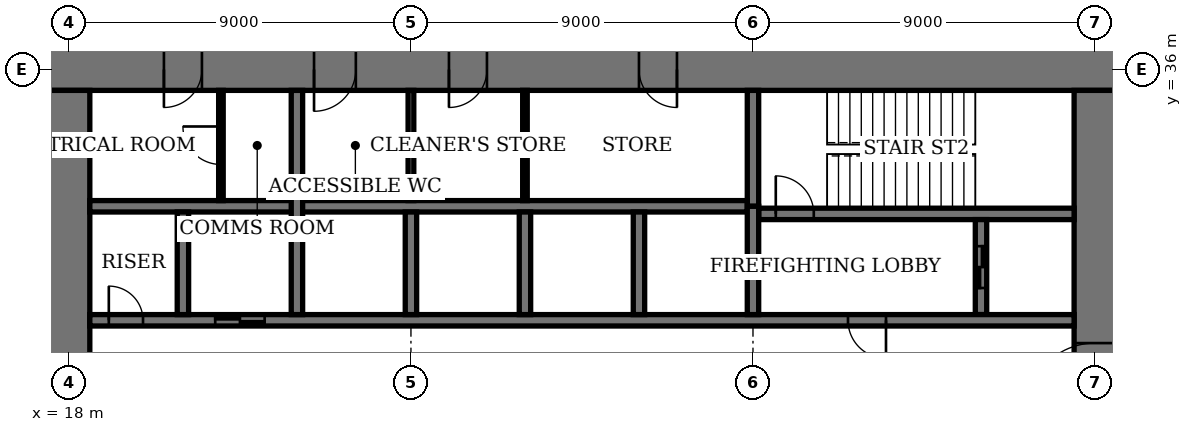
"""IFC4 building model, lengths in metres.
Left out: names, types, materials, properties, quantities, classifications, styles, units other than length and angle.
Written with IfcOpenShell. Run it as: python <this file> out.ifc"""

import sys

from ifc_helpers import new_model, si_unit, direction, frame, frame_2d, origin, place, context, subcontext, project, spatial, rectangle, extrude, element, fill, save


model = new_model("IFC4")
c1 = context("Model", 3, precision=1e-05, world=origin(), true_north=direction((0.0, 1.0)))
c2 = subcontext(c1, "Body", "Model", "MODEL_VIEW")
j1 = project(units=[si_unit("LENGTHUNIT", "METRE"), si_unit("PLANEANGLEUNIT", "RADIAN")], contexts=[c1])
p1 = place(None, origin())
s1 = spatial("IfcSite", under=j1, at=p1, CompositionType="ELEMENT")
p2 = place(p1, origin())
s2 = spatial("IfcBuilding", under=s1, at=p2, CompositionType="ELEMENT")
p3 = place(p2, frame((0.0, 0.0, 63.8)))
s3 = spatial("IfcBuildingStorey", under=s2, at=p3, CompositionType="ELEMENT", Elevation=63.8)
p4 = place(p3, frame((45.55, 36.0, 0.0), z_axis=(0.0, 0.0, 1.0), x_axis=(-1.0, 0.0, 0.0)))
e1 = element("IfcWall", 1, at=p4, inside=s3, PredefinedType="SHEAR", context=c2, shape_type="SweptSolid", body=[
    extrude(rectangle(XDim=28.1, YDim=1.1, at=frame_2d((14.05, 0.0))), origin(), (0.0, 0.0, 1.0), 4.0),
])
p5 = place(p4, frame((11.55, 0.0, 0.0)))
e2 = element("IfcOpeningElement", 2, at=p5, cuts=e1, PredefinedType="OPENING", context=c2, shape_type="SweptSolid", body=[
    extrude(rectangle(XDim=1.0, YDim=2.4, at=frame_2d((0.5, 1.2))), frame((0.0, 0.56, 0.0), z_axis=(0.0, -1.0, 0.0), x_axis=(1.0, 0.0, 0.0)), (0.0, 0.0, 1.0), 1.12),
])
p6 = place(p4, frame((16.55, 0.0, 0.0)))
e3 = element("IfcOpeningElement", 3, at=p6, cuts=e1, PredefinedType="OPENING", context=c2, shape_type="SweptSolid", body=[
    extrude(rectangle(XDim=1.0, YDim=2.4, at=frame_2d((0.5, 1.2))), frame((0.0, 0.56, 0.0), z_axis=(0.0, -1.0, 0.0), x_axis=(1.0, 0.0, 0.0)), (0.0, 0.0, 1.0), 1.12),
])
p7 = place(p4, frame((20.0, 0.0, 0.0)))
e4 = element("IfcOpeningElement", 4, at=p7, cuts=e1, PredefinedType="OPENING", context=c2, shape_type="SweptSolid", body=[
    extrude(rectangle(XDim=1.1, YDim=2.4, at=frame_2d((0.55, 1.2))), frame((0.0, 0.56, 0.0), z_axis=(0.0, -1.0, 0.0), x_axis=(1.0, 0.0, 0.0)), (0.0, 0.0, 1.0), 1.12),
])
p8 = place(p4, frame((24.05, 0.0, 0.0)))
e5 = element("IfcOpeningElement", 5, at=p8, cuts=e1, PredefinedType="OPENING", context=c2, shape_type="SweptSolid", body=[
    extrude(rectangle(XDim=1.0, YDim=2.4, at=frame_2d((0.5, 1.2))), frame((0.0, 0.56, 0.0), z_axis=(0.0, -1.0, 0.0), x_axis=(1.0, 0.0, 0.0)), (0.0, 0.0, 1.0), 1.12),
])
p9 = place(p3, frame((18.0, 35.45, 0.0), z_axis=(0.0, 0.0, 1.0), x_axis=(0.0, -1.0, 0.0)))
e6 = element("IfcWall", 6, at=p9, inside=s3, PredefinedType="SHEAR", context=c2, shape_type="SweptSolid", body=[
    extrude(rectangle(XDim=16.9, YDim=1.1, at=frame_2d((8.45, 0.0))), origin(), (0.0, 0.0, 1.0), 4.0),
])
p10 = place(p9, frame((8.45, 0.0, 0.0)))
e7 = element("IfcOpeningElement", 7, at=p10, cuts=e6, PredefinedType="OPENING", context=c2, shape_type="SweptSolid", body=[
    extrude(rectangle(XDim=1.8, YDim=2.4, at=frame_2d((0.9, 1.2))), frame((0.0, 0.56, 0.0), z_axis=(0.0, -1.0, 0.0), x_axis=(1.0, 0.0, 0.0)), (0.0, 0.0, 1.0), 1.12),
])
p11 = place(p3, frame((45.0, 18.55, 0.0), z_axis=(0.0, 0.0, 1.0), x_axis=(0.0, 1.0, 0.0)))
e8 = element("IfcWall", 8, at=p11, inside=s3, PredefinedType="SHEAR", context=c2, shape_type="SweptSolid", body=[
    extrude(rectangle(XDim=16.9, YDim=1.1, at=frame_2d((8.45, 0.0))), origin(), (0.0, 0.0, 1.0), 4.0),
])
p12 = place(p11, frame((8.45, 0.0, 0.0)))
e9 = element("IfcOpeningElement", 9, at=p12, cuts=e8, PredefinedType="OPENING", context=c2, shape_type="SweptSolid", body=[
    extrude(rectangle(XDim=1.8, YDim=2.4, at=frame_2d((0.9, 1.2))), frame((0.0, 0.56, 0.0), z_axis=(0.0, -1.0, 0.0), x_axis=(1.0, 0.0, 0.0)), (0.0, 0.0, 1.0), 1.12),
])
p13 = place(p3, frame((36.15, 32.2, 0.0), z_axis=(0.0, 0.0, 1.0), x_axis=(1.0, 0.0, 0.0)))
e10 = element("IfcWall", 10, at=p13, inside=s3, PredefinedType="SHEAR", context=c2, shape_type="SweptSolid", body=[
    extrude(rectangle(XDim=8.3, YDim=0.3, at=frame_2d((4.15, 0.0))), origin(), (0.0, 0.0, 1.0), 4.0),
])
p14 = place(p13, frame((0.45, 0.0, 0.0)))
e11 = element("IfcOpeningElement", 11, at=p14, cuts=e10, PredefinedType="OPENING", context=c2, shape_type="SweptSolid", body=[
    extrude(rectangle(XDim=1.0, YDim=2.4, at=frame_2d((0.5, 1.2))), frame((0.0, 0.16, 0.0), z_axis=(0.0, -1.0, 0.0), x_axis=(1.0, 0.0, 0.0)), (0.0, 0.0, 1.0), 0.32),
])
p15 = place(p3, frame((36.0, 32.4, 0.0), z_axis=(0.0, 0.0, 1.0), x_axis=(0.0, 1.0, 0.0)))
e12 = element("IfcWall", 12, at=p15, inside=s3, PredefinedType="SHEAR", context=c2, shape_type="SweptSolid", body=[
    extrude(rectangle(XDim=3.05, YDim=0.3, at=frame_2d((1.525, 0.0))), origin(), (0.0, 0.0, 1.0), 4.0),
])
p16 = place(p3, frame((42.0, 29.55, 0.0), z_axis=(0.0, 0.0, 1.0), x_axis=(0.0, 1.0, 0.0)))
e13 = element("IfcWall", 13, at=p16, inside=s3, PredefinedType="SHEAR", context=c2, shape_type="SweptSolid", body=[
    extrude(rectangle(XDim=2.5, YDim=0.3, at=frame_2d((1.25, 0.0))), origin(), (0.0, 0.0, 1.0), 4.0),
])
p17 = place(p16, frame((0.7, 0.0, 0.0)))
e14 = element("IfcOpeningElement", 14, at=p17, cuts=e13, PredefinedType="OPENING", context=c2, shape_type="SweptSolid", body=[
    extrude(rectangle(XDim=1.1, YDim=2.4, at=frame_2d((0.55, 1.2))), frame((0.0, 0.16, 0.0), z_axis=(0.0, -1.0, 0.0), x_axis=(1.0, 0.0, 0.0)), (0.0, 0.0, 1.0), 0.32),
])
p18 = place(p3, frame((18.55, 29.4, 0.0), z_axis=(0.0, 0.0, 1.0), x_axis=(1.0, 0.0, 0.0)))
e15 = element("IfcWall", 15, at=p18, inside=s3, PredefinedType="SHEAR", context=c2, shape_type="SweptSolid", body=[
    extrude(rectangle(XDim=25.9, YDim=0.3, at=frame_2d((12.95, 0.0))), origin(), (0.0, 0.0, 1.0), 4.0),
])
p19 = place(p18, frame((19.95, 0.0, 0.0)))
e16 = element("IfcOpeningElement", 16, at=p19, cuts=e15, PredefinedType="OPENING", context=c2, shape_type="SweptSolid", body=[
    extrude(rectangle(XDim=1.0, YDim=2.4, at=frame_2d((0.5, 1.2))), frame((0.0, 0.16, 0.0), z_axis=(0.0, -1.0, 0.0), x_axis=(1.0, 0.0, 0.0)), (0.0, 0.0, 1.0), 0.32),
])
p20 = place(p18, frame((0.5, 0.0, 0.0)))
e17 = element("IfcOpeningElement", 17, at=p20, cuts=e15, PredefinedType="OPENING", context=c2, shape_type="SweptSolid", body=[
    extrude(rectangle(XDim=0.9, YDim=2.1, at=frame_2d((0.45, 1.05))), frame((0.0, 0.16, 0.0), z_axis=(0.0, -1.0, 0.0), x_axis=(1.0, 0.0, 0.0)), (0.0, 0.0, 1.0), 0.32),
])
p21 = place(p18, frame((3.3, 0.0, 0.0)))
e18 = element("IfcOpeningElement", 18, at=p21, cuts=e15, PredefinedType="OPENING", context=c2, shape_type="SweptSolid", body=[
    extrude(rectangle(XDim=1.3, YDim=2.4, at=frame_2d((0.65, 1.2))), frame((0.0, 0.16, 0.0), z_axis=(0.0, -1.0, 0.0), x_axis=(1.0, 0.0, 0.0)), (0.0, 0.0, 1.0), 0.32),
])
p22 = place(p3, frame((18.55, 32.4, 0.0), z_axis=(0.0, 0.0, 1.0), x_axis=(1.0, 0.0, 0.0)))
e19 = element("IfcWall", 19, at=p22, inside=s3, PredefinedType="SHEAR", context=c2, shape_type="SweptSolid", body=[
    extrude(rectangle(XDim=17.3, YDim=0.3, at=frame_2d((8.65, 0.0))), origin(), (0.0, 0.0, 1.0), 4.0),
])
for number, where, z_axis, x_axis in (
    (20, (33.0, 29.55, 0.0), (0.0, 0.0, 1.0), (0.0, 1.0, 0.0)),
    (21, (30.0, 29.55, 0.0), (0.0, 0.0, 1.0), (0.0, 1.0, 0.0)),
    (22, (27.0, 29.55, 0.0), (0.0, 0.0, 1.0), (0.0, 1.0, 0.0)),
):
    element("IfcWall", number, at=place(p3, frame(where, z_axis=z_axis, x_axis=x_axis)), inside=s3, PredefinedType="SHEAR", context=c2, shape_type="SweptSolid", body=[
        extrude(rectangle(XDim=2.7, YDim=0.3, at=frame_2d((1.35, 0.0))), origin(), (0.0, 0.0, 1.0), 4.0),
    ])
p23 = place(p3, frame((24.0, 29.55, 0.0), z_axis=(0.0, 0.0, 1.0), x_axis=(0.0, 1.0, 0.0)))
e23 = element("IfcWall", 23, at=p23, inside=s3, PredefinedType="SHEAR", context=c2, shape_type="SweptSolid", body=[
    extrude(rectangle(XDim=5.9, YDim=0.3, at=frame_2d((2.95, 0.0))), origin(), (0.0, 0.0, 1.0), 4.0),
])
p24 = place(p3, frame((21.0, 29.55, 0.0), z_axis=(0.0, 0.0, 1.0), x_axis=(0.0, 1.0, 0.0)))
e24 = element("IfcWall", 24, at=p24, inside=s3, PredefinedType="SHEAR", context=c2, shape_type="SweptSolid", body=[
    extrude(rectangle(XDim=2.7, YDim=0.3, at=frame_2d((1.35, 0.0))), origin(), (0.0, 0.0, 1.0), 4.0),
])
p25 = place(p3, frame((36.0, 29.55, 0.0), z_axis=(0.0, 0.0, 1.0), x_axis=(0.0, 1.0, 0.0)))
e25 = element("IfcWall", 25, at=p25, inside=s3, PredefinedType="SHEAR", context=c2, shape_type="SweptSolid", body=[
    extrude(rectangle(XDim=2.85, YDim=0.3, at=frame_2d((1.425, 0.0))), origin(), (0.0, 0.0, 1.0), 4.0),
])
p26 = place(p3, frame((30.0, 32.55, 0.0), z_axis=(0.0, 0.0, 1.0), x_axis=(0.0, 1.0, 0.0)))
e26 = element("IfcWall", 26, at=p26, inside=s3, PredefinedType="PARTITIONING", context=c2, shape_type="SweptSolid", body=[
    extrude(rectangle(XDim=2.9, YDim=0.12, at=frame_2d((1.45, 0.0))), origin(), (0.0, 0.0, 1.0), 3.75),
])
p27 = place(p3, frame((27.0, 32.55, 0.0), z_axis=(0.0, 0.0, 1.0), x_axis=(0.0, 1.0, 0.0)))
e27 = element("IfcWall", 27, at=p27, inside=s3, PredefinedType="PARTITIONING", context=c2, shape_type="SweptSolid", body=[
    extrude(rectangle(XDim=2.9, YDim=0.15, at=frame_2d((1.45, 0.0))), origin(), (0.0, 0.0, 1.0), 3.75),
])
p28 = place(p3, frame((22.0, 32.55, 0.0), z_axis=(0.0, 0.0, 1.0), x_axis=(0.0, 1.0, 0.0)))
e28 = element("IfcWall", 28, at=p28, inside=s3, PredefinedType="PARTITIONING", context=c2, shape_type="SweptSolid", body=[
    extrude(rectangle(XDim=2.9, YDim=0.12, at=frame_2d((1.45, 0.0))), origin(), (0.0, 0.0, 1.0), 3.75),
])
p29 = place(p28, frame((0.95, 0.0, 0.0)))
e29 = element("IfcOpeningElement", 29, at=p29, cuts=e28, PredefinedType="OPENING", context=c2, shape_type="SweptSolid", body=[
    extrude(rectangle(XDim=1.0, YDim=2.4, at=frame_2d((0.5, 1.2))), frame((0.0, 0.07, 0.0), z_axis=(0.0, -1.0, 0.0), x_axis=(1.0, 0.0, 0.0)), (0.0, 0.0, 1.0), 0.14),
])
p30 = place(p12, origin())
e30 = element("IfcDoor", 30, at=p30, inside=s3, OperationType="DOUBLE_DOOR_DOUBLE_SWING", PredefinedType="DOOR", context=c2, shape_type="SweptSolid", body=[
    extrude(rectangle(XDim=1.8, YDim=2.4, at=frame_2d((0.9, 1.2))), frame((0.0, 0.03, 0.0), z_axis=(0.0, -1.0, 0.0), x_axis=(1.0, 0.0, 0.0)), (0.0, 0.0, 1.0), 0.06),
    extrude(rectangle(XDim=0.04, YDim=2.4, at=frame_2d((0.02, 1.2))), frame((0.0, 0.55, 0.0), z_axis=(0.0, -1.0, 0.0), x_axis=(1.0, 0.0, 0.0)), (0.0, 0.0, 1.0), 1.1),
    extrude(rectangle(XDim=0.04, YDim=2.4, at=frame_2d((1.78, 1.2))), frame((0.0, 0.55, 0.0), z_axis=(0.0, -1.0, 0.0), x_axis=(1.0, 0.0, 0.0)), (0.0, 0.0, 1.0), 1.1),
    extrude(rectangle(XDim=1.8, YDim=0.04, at=frame_2d((0.9, 2.38))), frame((0.0, 0.55, 0.0), z_axis=(0.0, -1.0, 0.0), x_axis=(1.0, 0.0, 0.0)), (0.0, 0.0, 1.0), 1.1),
])
fill(e9, e30)
p31 = place(p5, origin())
e31 = element("IfcDoor", 31, at=p31, inside=s3, OperationType="SINGLE_SWING_RIGHT", PredefinedType="DOOR", context=c2, shape_type="SweptSolid", body=[
    extrude(rectangle(XDim=1.0, YDim=2.4, at=frame_2d((0.5, 1.2))), frame((0.0, 0.025, 0.0), z_axis=(0.0, -1.0, 0.0), x_axis=(1.0, 0.0, 0.0)), (0.0, 0.0, 1.0), 0.05),
    extrude(rectangle(XDim=0.04, YDim=2.4, at=frame_2d((0.02, 1.2))), frame((0.0, 0.4, 0.0), z_axis=(0.0, -1.0, 0.0), x_axis=(1.0, 0.0, 0.0)), (0.0, 0.0, 1.0), 0.8),
    extrude(rectangle(XDim=0.04, YDim=2.4, at=frame_2d((0.98, 1.2))), frame((0.0, 0.4, 0.0), z_axis=(0.0, -1.0, 0.0), x_axis=(1.0, 0.0, 0.0)), (0.0, 0.0, 1.0), 0.8),
    extrude(rectangle(XDim=1.0, YDim=0.04, at=frame_2d((0.5, 2.38))), frame((0.0, 0.4, 0.0), z_axis=(0.0, -1.0, 0.0), x_axis=(1.0, 0.0, 0.0)), (0.0, 0.0, 1.0), 0.8),
])
fill(e2, e31)
p32 = place(p6, origin())
e32 = element("IfcDoor", 32, at=p32, inside=s3, OperationType="SINGLE_SWING_LEFT", PredefinedType="DOOR", context=c2, shape_type="SweptSolid", body=[
    extrude(rectangle(XDim=1.0, YDim=2.4, at=frame_2d((0.5, 1.2))), frame((0.0, 0.025, 0.0), z_axis=(0.0, -1.0, 0.0), x_axis=(1.0, 0.0, 0.0)), (0.0, 0.0, 1.0), 0.05),
    extrude(rectangle(XDim=0.04, YDim=2.4, at=frame_2d((0.02, 1.2))), frame((0.0, 0.4, 0.0), z_axis=(0.0, -1.0, 0.0), x_axis=(1.0, 0.0, 0.0)), (0.0, 0.0, 1.0), 0.8),
    extrude(rectangle(XDim=0.04, YDim=2.4, at=frame_2d((0.98, 1.2))), frame((0.0, 0.4, 0.0), z_axis=(0.0, -1.0, 0.0), x_axis=(1.0, 0.0, 0.0)), (0.0, 0.0, 1.0), 0.8),
    extrude(rectangle(XDim=1.0, YDim=0.04, at=frame_2d((0.5, 2.38))), frame((0.0, 0.4, 0.0), z_axis=(0.0, -1.0, 0.0), x_axis=(1.0, 0.0, 0.0)), (0.0, 0.0, 1.0), 0.8),
])
fill(e3, e32)
p33 = place(p7, origin())
e33 = element("IfcDoor", 33, at=p33, inside=s3, OperationType="SINGLE_SWING_LEFT", PredefinedType="DOOR", context=c2, shape_type="SweptSolid", body=[
    extrude(rectangle(XDim=1.1, YDim=2.4, at=frame_2d((0.55, 1.2))), frame((0.0, 0.025, 0.0), z_axis=(0.0, -1.0, 0.0), x_axis=(1.0, 0.0, 0.0)), (0.0, 0.0, 1.0), 0.05),
    extrude(rectangle(XDim=0.04, YDim=2.4, at=frame_2d((0.02, 1.2))), frame((0.0, 0.44, 0.0), z_axis=(0.0, -1.0, 0.0), x_axis=(1.0, 0.0, 0.0)), (0.0, 0.0, 1.0), 0.88),
    extrude(rectangle(XDim=0.04, YDim=2.4, at=frame_2d((1.08, 1.2))), frame((0.0, 0.44, 0.0), z_axis=(0.0, -1.0, 0.0), x_axis=(1.0, 0.0, 0.0)), (0.0, 0.0, 1.0), 0.88),
    extrude(rectangle(XDim=1.1, YDim=0.04, at=frame_2d((0.55, 2.38))), frame((0.0, 0.44, 0.0), z_axis=(0.0, -1.0, 0.0), x_axis=(1.0, 0.0, 0.0)), (0.0, 0.0, 1.0), 0.88),
])
fill(e4, e33)
p34 = place(p8, origin())
e34 = element("IfcDoor", 34, at=p34, inside=s3, OperationType="SINGLE_SWING_LEFT", PredefinedType="DOOR", context=c2, shape_type="SweptSolid", body=[
    extrude(rectangle(XDim=1.0, YDim=2.4, at=frame_2d((0.5, 1.2))), frame((0.0, 0.025, 0.0), z_axis=(0.0, -1.0, 0.0), x_axis=(1.0, 0.0, 0.0)), (0.0, 0.0, 1.0), 0.05),
    extrude(rectangle(XDim=0.04, YDim=2.4, at=frame_2d((0.02, 1.2))), frame((0.0, 0.4, 0.0), z_axis=(0.0, -1.0, 0.0), x_axis=(1.0, 0.0, 0.0)), (0.0, 0.0, 1.0), 0.8),
    extrude(rectangle(XDim=0.04, YDim=2.4, at=frame_2d((0.98, 1.2))), frame((0.0, 0.4, 0.0), z_axis=(0.0, -1.0, 0.0), x_axis=(1.0, 0.0, 0.0)), (0.0, 0.0, 1.0), 0.8),
    extrude(rectangle(XDim=1.0, YDim=0.04, at=frame_2d((0.5, 2.38))), frame((0.0, 0.4, 0.0), z_axis=(0.0, -1.0, 0.0), x_axis=(1.0, 0.0, 0.0)), (0.0, 0.0, 1.0), 0.8),
])
fill(e5, e34)
p35 = place(p14, origin())
e35 = element("IfcDoor", 35, at=p35, inside=s3, OperationType="SINGLE_SWING_RIGHT", PredefinedType="DOOR", context=c2, shape_type="SweptSolid", body=[
    extrude(rectangle(XDim=1.0, YDim=2.4, at=frame_2d((0.5, 1.2))), frame((0.0, 0.03, 0.0), z_axis=(0.0, -1.0, 0.0), x_axis=(1.0, 0.0, 0.0)), (0.0, 0.0, 1.0), 0.06),
])
fill(e11, e35)
p36 = place(p19, origin())
e36 = element("IfcDoor", 36, at=p36, inside=s3, OperationType="SINGLE_SWING_RIGHT", PredefinedType="DOOR", context=c2, shape_type="SweptSolid", body=[
    extrude(rectangle(XDim=1.0, YDim=2.4, at=frame_2d((0.5, 1.2))), frame((0.0, 0.03, 0.0), z_axis=(0.0, -1.0, 0.0), x_axis=(1.0, 0.0, 0.0)), (0.0, 0.0, 1.0), 0.06),
])
fill(e16, e36)
p37 = place(p20, origin())
e37 = element("IfcDoor", 37, at=p37, inside=s3, OperationType="SINGLE_SWING_RIGHT", PredefinedType="DOOR", context=c2, shape_type="SweptSolid", body=[
    extrude(rectangle(XDim=0.9, YDim=2.1, at=frame_2d((0.45, 1.05))), frame((0.0, 0.03, 0.0), z_axis=(0.0, -1.0, 0.0), x_axis=(1.0, 0.0, 0.0)), (0.0, 0.0, 1.0), 0.06),
])
fill(e17, e37)
p38 = place(p29, origin())
e38 = element("IfcDoor", 38, at=p38, inside=s3, OperationType="SINGLE_SWING_LEFT", PredefinedType="DOOR", context=c2, shape_type="SweptSolid", body=[
    extrude(rectangle(XDim=1.0, YDim=2.4, at=frame_2d((0.5, 1.2))), frame((0.0, 0.03, 0.0), z_axis=(0.0, -1.0, 0.0), x_axis=(1.0, 0.0, 0.0)), (0.0, 0.0, 1.0), 0.06),
])
fill(e29, e38)
p39 = place(p21, origin())
e39 = element("IfcDoor", 39, at=p39, inside=s3, OperationType="DOUBLE_DOOR_SLIDING", PredefinedType="DOOR", context=c2, shape_type="SweptSolid", body=[
    extrude(rectangle(XDim=1.3, YDim=2.4, at=frame_2d((0.65, 1.2))), frame((0.0, 0.02, 0.0), z_axis=(0.0, -1.0, 0.0), x_axis=(1.0, 0.0, 0.0)), (0.0, 0.0, 1.0), 0.04),
])
fill(e18, e39)
p40 = place(p17, origin())
e40 = element("IfcDoor", 40, at=p40, inside=s3, OperationType="DOUBLE_DOOR_SLIDING", PredefinedType="DOOR", context=c2, shape_type="SweptSolid", body=[
    extrude(rectangle(XDim=1.1, YDim=2.4, at=frame_2d((0.55, 1.2))), frame((0.0, 0.03, 0.0), z_axis=(0.0, -1.0, 0.0), x_axis=(1.0, 0.0, 0.0)), (0.0, 0.0, 1.0), 0.06),
])
fill(e14, e40)
save(model, sys.argv[1])
